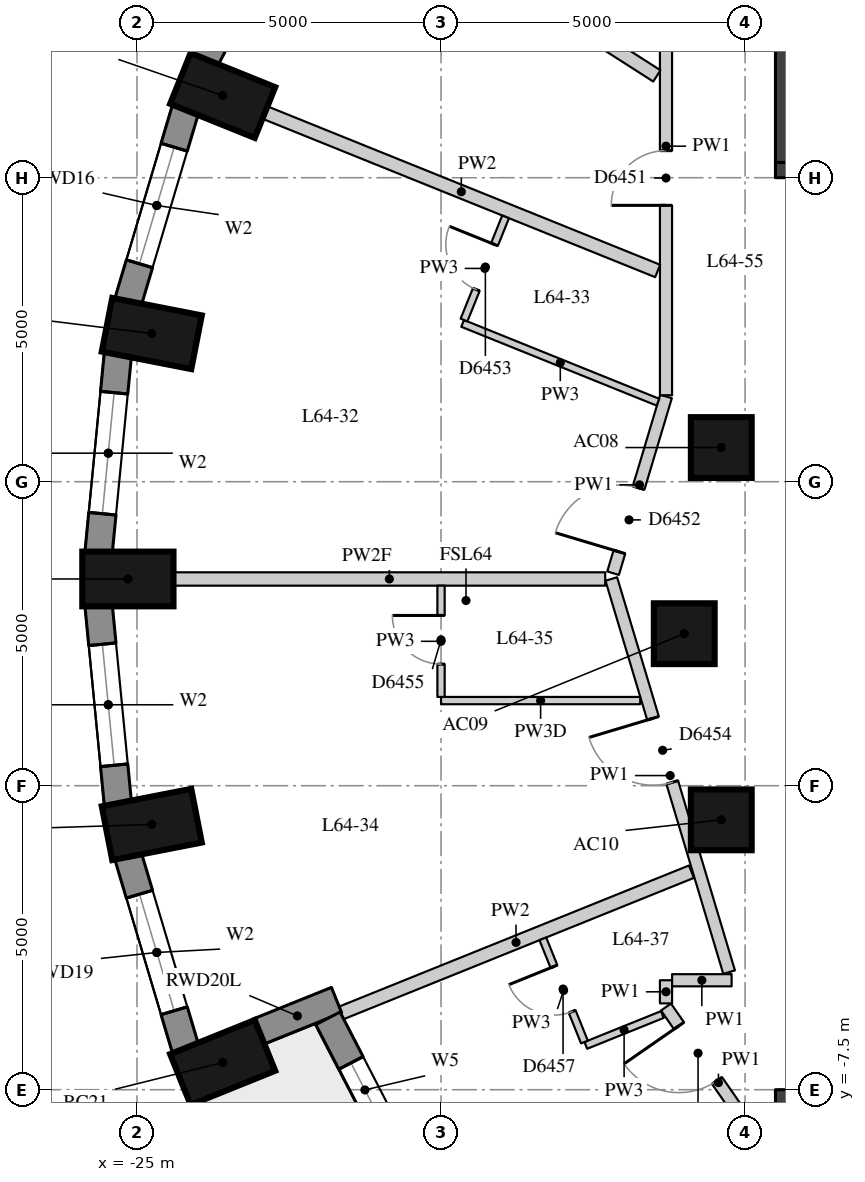
"""IFC4 building model, lengths in metres.
Left out: names, types, materials, properties, quantities, classifications, styles, units other than length and angle.
Written with IfcOpenShell. Run it as: python <this file> out.ifc"""

import sys

from ifc_helpers import new_model, si_unit, direction, frame, frame_2d, origin, origin_2d, place, context, subcontext, project, spatial, rectangle, extrude, element, fill, save


model = new_model("IFC4")
c1 = context("Model", 3, precision=1e-05, world=origin(), true_north=direction((0.0, 1.0)))
c2 = subcontext(c1, "Body", "Model", "MODEL_VIEW")
j1 = project(units=[si_unit("LENGTHUNIT", "METRE"), si_unit("PLANEANGLEUNIT", "RADIAN")], contexts=[c1])
p1 = place(None, origin())
s1 = spatial("IfcSite", under=j1, at=p1, CompositionType="ELEMENT")
p2 = place(p1, origin())
s2 = spatial("IfcBuilding", under=s1, at=p2, CompositionType="ELEMENT")
p3 = place(p2, frame((0.0, 0.0, 225.5)))
s3 = spatial("IfcBuildingStorey", under=s2, at=p3, CompositionType="ELEMENT", Elevation=225.5)
for number, where, z_axis, x_axis in (
    (1, (-23.591, 8.852, 0.0), (0.0, 0.0, 1.0), (-0.927, 0.374, 0.0)),
    (2, (-24.757, 4.937, 0.0), (0.0, 0.0, 1.0), (-0.981, 0.192, 0.0)),
    (3, (-25.15, 0.9, 0.0), (0.0, 0.0, 1.0), (-1.0, 0.0, 0.0)),
    (4, (-24.757, -3.137, 0.0), (0.0, 0.0, 1.0), (-0.981, -0.192, 0.0)),
    (5, (-23.591, -7.052, 0.0), (0.0, 0.0, 1.0), (-0.927, -0.374, 0.0)),
):
    element("IfcColumn", number, at=place(p3, frame(where, z_axis=z_axis, x_axis=x_axis)), inside=s3, PredefinedType="COLUMN", context=c2, shape_type="SweptSolid", body=[
        extrude(rectangle(XDim=1.5, YDim=0.9, at=origin_2d()), origin(), (0.0, 0.0, 1.0), 3.3),
    ])
for number, where, z_axis, x_axis in (
    (6, (-15.391, 3.062, 0.0), (0.0, 0.0, 1.0), (1.0, 0.0, 0.0)),
    (7, (-16.0, 0.0, 0.0), (0.0, 0.0, 1.0), (1.0, 0.0, 0.0)),
    (8, (-15.391, -3.062, 0.0), (0.0, 0.0, 1.0), (1.0, 0.0, 0.0)),
):
    element("IfcColumn", number, at=place(p3, frame(where, z_axis=z_axis, x_axis=x_axis)), inside=s3, PredefinedType="COLUMN", context=c2, shape_type="SweptSolid", body=[
        extrude(rectangle(XDim=1.0, YDim=1.0, at=origin_2d()), origin(), (0.0, 0.0, 1.0), 3.3),
    ])
p4 = place(p3, frame((-22.327, 12.424, 0.0), z_axis=(0.0, 0.0, 1.0), x_axis=(-0.460232593174, -0.887798378113, 0.0)))
e9 = element("IfcWall", 9, at=p4, inside=s3, PredefinedType="SOLIDWALL", context=c2, shape_type="SweptSolid", body=[
    extrude(rectangle(XDim=3.371, YDim=0.45, at=frame_2d((1.685, 0.0))), origin(), (0.0, 0.0, 1.0), 2.85),
])
p5 = place(p4, frame((0.685, 0.0, 0.4)))
e10 = element("IfcOpeningElement", 10, at=p5, cuts=e9, PredefinedType="OPENING", context=c2, shape_type="SweptSolid", body=[
    extrude(rectangle(XDim=2.0, YDim=1.75, at=frame_2d((1.0, 0.875))), frame((0.0, 0.235, 0.0), z_axis=(0.0, -1.0, 0.0), x_axis=(1.0, 0.0, 0.0)), (0.0, 0.0, 1.0), 0.47),
])
p6 = place(p3, frame((-24.2, 8.634, 0.0), z_axis=(0.0, 0.0, 1.0), x_axis=(-0.285444972963, -0.958395099847, 0.0)))
e11 = element("IfcWall", 11, at=p6, inside=s3, PredefinedType="SOLIDWALL", context=c2, shape_type="SweptSolid", body=[
    extrude(rectangle(XDim=3.32, YDim=0.45, at=frame_2d((1.66, 0.0))), origin(), (0.0, 0.0, 1.0), 2.85),
])
p7 = place(p6, frame((0.66, 0.0, 0.4)))
e12 = element("IfcOpeningElement", 12, at=p7, cuts=e11, PredefinedType="OPENING", context=c2, shape_type="SweptSolid", body=[
    extrude(rectangle(XDim=2.0, YDim=1.75, at=frame_2d((1.0, 0.875))), frame((0.0, 0.235, 0.0), z_axis=(0.0, -1.0, 0.0), x_axis=(1.0, 0.0, 0.0)), (0.0, 0.0, 1.0), 0.47),
])
p8 = place(p3, frame((-25.313, 4.608, 0.0), z_axis=(0.0, 0.0, 1.0), x_axis=(-0.096824116835, -0.995301507283, 0.0)))
e13 = element("IfcWall", 13, at=p8, inside=s3, PredefinedType="SOLIDWALL", context=c2, shape_type="SweptSolid", body=[
    extrude(rectangle(XDim=3.293, YDim=0.45, at=frame_2d((1.646, 0.0))), origin(), (0.0, 0.0, 1.0), 2.85),
])
p9 = place(p8, frame((0.646, 0.0, 0.4)))
e14 = element("IfcOpeningElement", 14, at=p9, cuts=e13, PredefinedType="OPENING", context=c2, shape_type="SweptSolid", body=[
    extrude(rectangle(XDim=2.0, YDim=1.75, at=frame_2d((1.0, 0.875))), frame((0.0, 0.235, 0.0), z_axis=(0.0, -1.0, 0.0), x_axis=(1.0, 0.0, 0.0)), (0.0, 0.0, 1.0), 0.47),
])
p10 = place(p3, frame((-25.632, 0.47, 0.0), z_axis=(0.0, 0.0, 1.0), x_axis=(0.096816972749, -0.995302202242, 0.0)))
e15 = element("IfcWall", 15, at=p10, inside=s3, PredefinedType="SOLIDWALL", context=c2, shape_type="SweptSolid", body=[
    extrude(rectangle(XDim=3.293, YDim=0.45, at=frame_2d((1.646, 0.0))), origin(), (0.0, 0.0, 1.0), 2.85),
])
p11 = place(p10, frame((0.646, 0.0, 0.4)))
e16 = element("IfcOpeningElement", 16, at=p11, cuts=e15, PredefinedType="OPENING", context=c2, shape_type="SweptSolid", body=[
    extrude(rectangle(XDim=2.0, YDim=1.75, at=frame_2d((1.0, 0.875))), frame((0.0, 0.235, 0.0), z_axis=(0.0, -1.0, 0.0), x_axis=(1.0, 0.0, 0.0)), (0.0, 0.0, 1.0), 0.47),
])
p12 = place(p3, frame((-25.148, -3.652, 0.0), z_axis=(0.0, 0.0, 1.0), x_axis=(0.285444972963, -0.958395099847, 0.0)))
e17 = element("IfcWall", 17, at=p12, inside=s3, PredefinedType="SOLIDWALL", context=c2, shape_type="SweptSolid", body=[
    extrude(rectangle(XDim=3.32, YDim=0.45, at=frame_2d((1.66, 0.0))), origin(), (0.0, 0.0, 1.0), 2.85),
])
p13 = place(p12, frame((0.66, 0.0, 0.4)))
e18 = element("IfcOpeningElement", 18, at=p13, cuts=e17, PredefinedType="OPENING", context=c2, shape_type="SweptSolid", body=[
    extrude(rectangle(XDim=2.0, YDim=1.75, at=frame_2d((1.0, 0.875))), frame((0.0, 0.235, 0.0), z_axis=(0.0, -1.0, 0.0), x_axis=(1.0, 0.0, 0.0)), (0.0, 0.0, 1.0), 0.47),
])
p14 = place(p3, frame((-23.008, -6.546, 0.0), z_axis=(0.0, 0.0, 1.0), x_axis=(0.927346156366, 0.37420463155, 0.0)))
e19 = element("IfcWall", 19, at=p14, inside=s3, PredefinedType="SOLIDWALL", context=c2, shape_type="SweptSolid", body=[
    extrude(rectangle(XDim=1.39, YDim=0.45, at=frame_2d((0.695, 0.0))), origin(), (0.0, 0.0, 1.0), 2.85),
])
p15 = place(p3, frame((-21.861, -6.326, 0.0), z_axis=(0.0, 0.0, 1.0), x_axis=(0.45924645187, -0.888308896975, 0.0)))
e20 = element("IfcWall", 20, at=p15, inside=s3, PredefinedType="SOLIDWALL", context=c2, shape_type="SweptSolid", body=[
    extrude(rectangle(XDim=3.802, YDim=0.45, at=frame_2d((1.901, 0.0))), origin(), (0.0, 0.0, 1.0), 2.85),
])
p16 = place(p15, frame((0.826, 0.0, 0.4)))
e21 = element("IfcOpeningElement", 21, at=p16, cuts=e20, PredefinedType="OPENING", context=c2, shape_type="SweptSolid", body=[
    extrude(rectangle(XDim=1.0, YDim=1.75, at=frame_2d((0.5, 0.875))), frame((0.0, 0.235, 0.0), z_axis=(0.0, -1.0, 0.0), x_axis=(1.0, 0.0, 0.0)), (0.0, 0.0, 1.0), 0.47),
])
p17 = place(p15, frame((1.976, 0.0, 0.0)))
e22 = element("IfcOpeningElement", 22, at=p17, cuts=e20, PredefinedType="OPENING", context=c2, shape_type="SweptSolid", body=[
    extrude(rectangle(XDim=1.0, YDim=2.15, at=frame_2d((0.5, 1.075))), frame((0.0, 0.235, 0.0), z_axis=(0.0, -1.0, 0.0), x_axis=(1.0, 0.0, 0.0)), (0.0, 0.0, 1.0), 0.47),
])
p18 = place(p3, frame((-14.375, 7.75, -0.28), z_axis=(0.0, 0.0, 1.0), x_axis=(0.0, 1.0, 0.0)))
e23 = element("IfcWall", 23, at=p18, inside=s3, PredefinedType="SHEAR", context=c2, shape_type="SweptSolid", body=[
    extrude(rectangle(XDim=6.0, YDim=0.25, at=frame_2d((3.0, 0.0))), origin(), (0.0, 0.0, 1.0), 3.13),
])
for number, where, z_axis, x_axis in (
    (24, (-14.5, 7.625, -0.28), (0.0, 0.0, 1.0), (1.0, 0.0, 0.0)),
    (25, (-14.5, -7.625, -0.28), (0.0, 0.0, 1.0), (1.0, 0.0, 0.0)),
):
    element("IfcWall", number, at=place(p3, frame(where, z_axis=z_axis, x_axis=x_axis)), inside=s3, PredefinedType="SHEAR", context=c2, shape_type="SweptSolid", body=[
        extrude(rectangle(XDim=5.2, YDim=0.25, at=frame_2d((2.6, 0.0))), origin(), (0.0, 0.0, 1.0), 3.13),
    ])
p19 = place(p3, frame((-14.575, -8.627, 0.0), z_axis=(0.0, 0.0, 1.0), x_axis=(-0.569910381143, 0.821706856163, 0.0)))
e26 = element("IfcWall", 26, at=p19, inside=s3, PredefinedType="PARTITIONING", context=c2, shape_type="SweptSolid", body=[
    extrude(rectangle(XDim=3.026, YDim=0.2, at=frame_2d((1.513, 0.0))), origin(), (0.0, 0.0, 1.0), 2.85),
])
p20 = place(p19, frame((1.552, 0.0, 0.0)))
e27 = element("IfcOpeningElement", 27, at=p20, cuts=e26, PredefinedType="OPENING", context=c2, shape_type="SweptSolid", body=[
    extrude(rectangle(XDim=1.1, YDim=2.1, at=frame_2d((0.55, 1.05))), frame((0.0, 0.11, 0.0), z_axis=(0.0, -1.0, 0.0), x_axis=(1.0, 0.0, 0.0)), (0.0, 0.0, 1.0), 0.22),
])
p21 = place(p3, frame((-16.3, -6.08, 0.0), z_axis=(0.0, 0.0, 1.0), x_axis=(0.0, 1.0, 0.0)))
e28 = element("IfcWall", 28, at=p21, inside=s3, PredefinedType="PARTITIONING", context=c2, shape_type="SweptSolid", body=[
    extrude(rectangle(XDim=0.38, YDim=0.2, at=frame_2d((0.19, 0.0))), origin(), (0.0, 0.0, 1.0), 2.85),
])
p22 = place(p3, frame((-16.2, -5.7, 0.0), z_axis=(0.0, 0.0, 1.0), x_axis=(1.0, 0.0, 0.0)))
e29 = element("IfcWall", 29, at=p22, inside=s3, PredefinedType="PARTITIONING", context=c2, shape_type="SweptSolid", body=[
    extrude(rectangle(XDim=0.979, YDim=0.2, at=frame_2d((0.489, 0.0))), origin(), (0.0, 0.0, 1.0), 2.85),
])
p23 = place(p3, frame((-15.262, -5.567, 0.0), z_axis=(0.0, 0.0, 1.0), x_axis=(-0.28704593875, 0.957916817395, 0.0)))
e30 = element("IfcWall", 30, at=p23, inside=s3, PredefinedType="PARTITIONING", context=c2, shape_type="SweptSolid", body=[
    extrude(rectangle(XDim=6.751, YDim=0.2, at=frame_2d((3.375, 0.0))), origin(), (0.0, 0.0, 1.0), 2.85),
])
p24 = place(p23, frame((3.259, 0.0, 0.0)))
e31 = element("IfcOpeningElement", 31, at=p24, cuts=e30, PredefinedType="OPENING", context=c2, shape_type="SweptSolid", body=[
    extrude(rectangle(XDim=1.1, YDim=2.1, at=frame_2d((0.55, 1.05))), frame((0.0, 0.11, 0.0), z_axis=(0.0, -1.0, 0.0), x_axis=(1.0, 0.0, 0.0)), (0.0, 0.0, 1.0), 0.22),
])
p25 = place(p3, frame((-17.171, 0.995, 0.0), z_axis=(0.0, 0.0, 1.0), x_axis=(0.286919722033, 0.957954629984, 0.0)))
e32 = element("IfcWall", 32, at=p25, inside=s3, PredefinedType="PARTITIONING", context=c2, shape_type="SweptSolid", body=[
    extrude(rectangle(XDim=3.034, YDim=0.2, at=frame_2d((1.517, 0.0))), origin(), (0.0, 0.0, 1.0), 2.85),
])
p26 = place(p25, frame((0.365, 0.0, 0.0)))
e33 = element("IfcOpeningElement", 33, at=p26, cuts=e32, PredefinedType="OPENING", context=c2, shape_type="SweptSolid", body=[
    extrude(rectangle(XDim=1.1, YDim=2.1, at=frame_2d((0.55, 1.05))), frame((0.0, 0.11, 0.0), z_axis=(0.0, -1.0, 0.0), x_axis=(1.0, 0.0, 0.0)), (0.0, 0.0, 1.0), 0.22),
])
p27 = place(p3, frame((-16.3, 3.922, 0.0), z_axis=(0.0, 0.0, 1.0), x_axis=(0.0, 1.0, 0.0)))
e34 = element("IfcWall", 34, at=p27, inside=s3, PredefinedType="PARTITIONING", context=c2, shape_type="SweptSolid", body=[
    extrude(rectangle(XDim=8.193, YDim=0.2, at=frame_2d((4.097, 0.0))), origin(), (0.0, 0.0, 1.0), 2.85),
])
p28 = place(p27, frame((6.953, 0.0, 0.0)))
e35 = element("IfcOpeningElement", 35, at=p28, cuts=e34, PredefinedType="OPENING", context=c2, shape_type="SweptSolid", body=[
    extrude(rectangle(XDim=1.1, YDim=2.1, at=frame_2d((0.55, 1.05))), frame((0.0, 0.11, 0.0), z_axis=(0.0, -1.0, 0.0), x_axis=(1.0, 0.0, 0.0)), (0.0, 0.0, 1.0), 0.22),
])
p29 = place(p27, frame((3.123, 0.0, 0.0)))
e36 = element("IfcOpeningElement", 36, at=p29, cuts=e34, PredefinedType="OPENING", context=c2, shape_type="SweptSolid", body=[
    extrude(rectangle(XDim=0.9, YDim=2.1, at=frame_2d((0.45, 1.05))), frame((0.0, 0.11, 0.0), z_axis=(0.0, -1.0, 0.0), x_axis=(1.0, 0.0, 0.0)), (0.0, 0.0, 1.0), 0.22),
])
p30 = place(p3, frame((-21.055, 12.121, 0.0), z_axis=(0.0, 0.0, 1.0), x_axis=(0.842286811608, -0.539029616061, 0.0)))
e37 = element("IfcWall", 37, at=p30, inside=s3, PredefinedType="PARTITIONING", context=c2, shape_type="SweptSolid", body=[
    extrude(rectangle(XDim=5.466, YDim=0.22, at=frame_2d((2.733, 0.0))), origin(), (0.0, 0.0, 1.0), 2.85),
])
p31 = place(p3, frame((-22.896, 8.571, 0.0), z_axis=(0.0, 0.0, 1.0), x_axis=(0.927387137769, -0.374103056256, 0.0)))
e38 = element("IfcWall", 38, at=p31, inside=s3, PredefinedType="PARTITIONING", context=c2, shape_type="SweptSolid", body=[
    extrude(rectangle(XDim=6.964, YDim=0.22, at=frame_2d((3.482, 0.0))), origin(), (0.0, 0.0, 1.0), 2.85),
])
p32 = place(p3, frame((-24.4, 0.9, 0.0), z_axis=(0.0, 0.0, 1.0), x_axis=(1.0, 0.0, 0.0)))
e39 = element("IfcWall", 39, at=p32, inside=s3, PredefinedType="PARTITIONING", context=c2, shape_type="SweptSolid", body=[
    extrude(rectangle(XDim=7.1, YDim=0.22, at=frame_2d((3.55, 0.0))), origin(), (0.0, 0.0, 1.0), 2.3),
])
p33 = place(p3, frame((-21.651, -6.241, 0.0), z_axis=(0.0, 0.0, 1.0), x_axis=(0.927390089179, 0.37409573974, 0.0)))
e40 = element("IfcWall", 40, at=p33, inside=s3, PredefinedType="PARTITIONING", context=c2, shape_type="SweptSolid", body=[
    extrude(rectangle(XDim=6.221, YDim=0.22, at=frame_2d((3.11, 0.0))), origin(), (0.0, 0.0, 1.0), 2.85),
])
p34 = place(p3, frame((-16.433, 3.808, 0.0), z_axis=(0.0, 0.0, 1.0), x_axis=(-0.927374031513, 0.374135544522, 0.0)))
e41 = element("IfcWall", 41, at=p34, inside=s3, PredefinedType="PARTITIONING", context=c2, shape_type="SweptSolid", body=[
    extrude(rectangle(XDim=3.464, YDim=0.12, at=frame_2d((1.732, 0.0))), origin(), (0.0, 0.0, 1.0), 2.85),
])
p35 = place(p3, frame((-16.725, -1.1, 0.0), z_axis=(0.0, 0.0, 1.0), x_axis=(-1.0, 0.0, 0.0)))
e42 = element("IfcWall", 42, at=p35, inside=s3, PredefinedType="PARTITIONING", context=c2, shape_type="SweptSolid", body=[
    extrude(rectangle(XDim=3.275, YDim=0.12, at=frame_2d((1.638, 0.0))), origin(), (0.0, 0.0, 1.0), 2.3),
])
p36 = place(p3, frame((-16.36, -6.264, 0.0), z_axis=(0.0, 0.0, 1.0), x_axis=(-0.927381089245, -0.374118049967, 0.0)))
e43 = element("IfcWall", 43, at=p36, inside=s3, PredefinedType="PARTITIONING", context=c2, shape_type="SweptSolid", body=[
    extrude(rectangle(XDim=1.357, YDim=0.12, at=frame_2d((0.679, 0.0))), origin(), (0.0, 0.0, 1.0), 2.85),
])
p37 = place(p3, frame((-19.622, 5.159, 0.0), z_axis=(0.0, 0.0, 1.0), x_axis=(0.373873925611, 0.927479534948, 0.0)))
e44 = element("IfcWall", 44, at=p37, inside=s3, PredefinedType="PARTITIONING", context=c2, shape_type="SweptSolid", body=[
    extrude(rectangle(XDim=1.83, YDim=0.12, at=frame_2d((0.915, 0.0))), origin(), (0.0, 0.0, 1.0), 2.85),
])
p38 = place(p37, frame((0.54, 0.0, 0.0)))
e45 = element("IfcOpeningElement", 45, at=p38, cuts=e44, PredefinedType="OPENING", context=c2, shape_type="SweptSolid", body=[
    extrude(rectangle(XDim=0.8, YDim=2.1, at=frame_2d((0.4, 1.05))), frame((0.0, 0.07, 0.0), z_axis=(0.0, -1.0, 0.0), x_axis=(1.0, 0.0, 0.0)), (0.0, 0.0, 1.0), 0.14),
])
p39 = place(p3, frame((-20.0, -1.04, 0.0), z_axis=(0.0, 0.0, 1.0), x_axis=(0.0, 1.0, 0.0)))
e46 = element("IfcWall", 46, at=p39, inside=s3, PredefinedType="PARTITIONING", context=c2, shape_type="SweptSolid", body=[
    extrude(rectangle(XDim=1.83, YDim=0.12, at=frame_2d((0.915, 0.0))), origin(), (0.0, 0.0, 1.0), 2.85),
])
p40 = place(p39, frame((0.54, 0.0, 0.0)))
e47 = element("IfcOpeningElement", 47, at=p40, cuts=e46, PredefinedType="OPENING", context=c2, shape_type="SweptSolid", body=[
    extrude(rectangle(XDim=0.8, YDim=2.1, at=frame_2d((0.4, 1.05))), frame((0.0, 0.07, 0.0), z_axis=(0.0, -1.0, 0.0), x_axis=(1.0, 0.0, 0.0)), (0.0, 0.0, 1.0), 0.14),
])
p41 = place(p3, frame((-17.641, -6.716, 0.0), z_axis=(0.0, 0.0, 1.0), x_axis=(-0.374103450988, 0.927386978536, 0.0)))
e48 = element("IfcWall", 48, at=p41, inside=s3, PredefinedType="PARTITIONING", context=c2, shape_type="SweptSolid", body=[
    extrude(rectangle(XDim=1.83, YDim=0.12, at=frame_2d((0.915, 0.0))), origin(), (0.0, 0.0, 1.0), 2.85),
])
p42 = place(p41, frame((0.54, 0.0, 0.0)))
e49 = element("IfcOpeningElement", 49, at=p42, cuts=e48, PredefinedType="OPENING", context=c2, shape_type="SweptSolid", body=[
    extrude(rectangle(XDim=0.8, YDim=2.1, at=frame_2d((0.4, 1.05))), frame((0.0, 0.07, 0.0), z_axis=(0.0, -1.0, 0.0), x_axis=(1.0, 0.0, 0.0)), (0.0, 0.0, 1.0), 0.14),
])
p43 = place(p7, origin())
e50 = element("IfcWindow", 50, at=p43, inside=s3, PartitioningType="SINGLE_PANEL", PredefinedType="WINDOW", context=c2, shape_type="SweptSolid", body=[
    extrude(rectangle(XDim=2.0, YDim=1.75, at=frame_2d((1.0, 0.875))), frame((0.0, 0.035, 0.0), z_axis=(0.0, -1.0, 0.0), x_axis=(1.0, 0.0, 0.0)), (0.0, 0.0, 1.0), 0.06),
])
fill(e12, e50)
p44 = place(p9, origin())
e51 = element("IfcWindow", 51, at=p44, inside=s3, PartitioningType="SINGLE_PANEL", PredefinedType="WINDOW", context=c2, shape_type="SweptSolid", body=[
    extrude(rectangle(XDim=2.0, YDim=1.75, at=frame_2d((1.0, 0.875))), frame((0.0, 0.035, 0.0), z_axis=(0.0, -1.0, 0.0), x_axis=(1.0, 0.0, 0.0)), (0.0, 0.0, 1.0), 0.06),
])
fill(e14, e51)
p45 = place(p11, origin())
e52 = element("IfcWindow", 52, at=p45, inside=s3, PartitioningType="SINGLE_PANEL", PredefinedType="WINDOW", context=c2, shape_type="SweptSolid", body=[
    extrude(rectangle(XDim=2.0, YDim=1.75, at=frame_2d((1.0, 0.875))), frame((0.0, 0.035, 0.0), z_axis=(0.0, -1.0, 0.0), x_axis=(1.0, 0.0, 0.0)), (0.0, 0.0, 1.0), 0.06),
])
fill(e16, e52)
p46 = place(p13, origin())
e53 = element("IfcWindow", 53, at=p46, inside=s3, PartitioningType="SINGLE_PANEL", PredefinedType="WINDOW", context=c2, shape_type="SweptSolid", body=[
    extrude(rectangle(XDim=2.0, YDim=1.75, at=frame_2d((1.0, 0.875))), frame((0.0, 0.035, 0.0), z_axis=(0.0, -1.0, 0.0), x_axis=(1.0, 0.0, 0.0)), (0.0, 0.0, 1.0), 0.06),
])
fill(e18, e53)
p47 = place(p16, origin())
e54 = element("IfcWindow", 54, at=p47, inside=s3, PartitioningType="SINGLE_PANEL", PredefinedType="WINDOW", context=c2, shape_type="SweptSolid", body=[
    extrude(rectangle(XDim=1.0, YDim=1.75, at=frame_2d((0.5, 0.875))), frame((0.0, 0.035, 0.0), z_axis=(0.0, -1.0, 0.0), x_axis=(1.0, 0.0, 0.0)), (0.0, 0.0, 1.0), 0.06),
])
fill(e21, e54)
p48 = place(p29, origin())
e55 = element("IfcDoor", 55, at=p48, inside=s3, OperationType="SINGLE_SWING_LEFT", PredefinedType="DOOR", context=c2, shape_type="SweptSolid", body=[
    extrude(rectangle(XDim=0.9, YDim=2.1, at=frame_2d((0.45, 1.05))), frame((0.0, 0.025, 0.0), z_axis=(0.0, -1.0, 0.0), x_axis=(1.0, 0.0, 0.0)), (0.0, 0.0, 1.0), 0.05),
])
fill(e36, e55)
p49 = place(p26, origin())
e56 = element("IfcDoor", 56, at=p49, inside=s3, OperationType="SINGLE_SWING_LEFT", PredefinedType="DOOR", context=c2, shape_type="SweptSolid", body=[
    extrude(rectangle(XDim=1.1, YDim=2.1, at=frame_2d((0.55, 1.05))), frame((0.0, 0.025, 0.0), z_axis=(0.0, -1.0, 0.0), x_axis=(1.0, 0.0, 0.0)), (0.0, 0.0, 1.0), 0.05),
])
fill(e33, e56)
p50 = place(p38, origin())
e57 = element("IfcDoor", 57, at=p50, inside=s3, OperationType="SINGLE_SWING_RIGHT", PredefinedType="DOOR", context=c2, shape_type="SweptSolid", body=[
    extrude(rectangle(XDim=0.8, YDim=2.1, at=frame_2d((0.4, 1.05))), frame((0.0, 0.025, 0.0), z_axis=(0.0, -1.0, 0.0), x_axis=(1.0, 0.0, 0.0)), (0.0, 0.0, 1.0), 0.05),
])
fill(e45, e57)
p51 = place(p24, origin())
e58 = element("IfcDoor", 58, at=p51, inside=s3, OperationType="SINGLE_SWING_RIGHT", PredefinedType="DOOR", context=c2, shape_type="SweptSolid", body=[
    extrude(rectangle(XDim=1.1, YDim=2.1, at=frame_2d((0.55, 1.05))), frame((0.0, 0.025, 0.0), z_axis=(0.0, -1.0, 0.0), x_axis=(1.0, 0.0, 0.0)), (0.0, 0.0, 1.0), 0.05),
])
fill(e31, e58)
p52 = place(p40, origin())
e59 = element("IfcDoor", 59, at=p52, inside=s3, OperationType="SINGLE_SWING_RIGHT", PredefinedType="DOOR", context=c2, shape_type="SweptSolid", body=[
    extrude(rectangle(XDim=0.8, YDim=2.1, at=frame_2d((0.4, 1.05))), frame((0.0, 0.025, 0.0), z_axis=(0.0, -1.0, 0.0), x_axis=(1.0, 0.0, 0.0)), (0.0, 0.0, 1.0), 0.05),
])
fill(e47, e59)
p53 = place(p20, origin())
e60 = element("IfcDoor", 60, at=p53, inside=s3, OperationType="SINGLE_SWING_RIGHT", PredefinedType="DOOR", context=c2, shape_type="SweptSolid", body=[
    extrude(rectangle(XDim=1.1, YDim=2.1, at=frame_2d((0.55, 1.05))), frame((0.0, 0.025, 0.0), z_axis=(0.0, -1.0, 0.0), x_axis=(1.0, 0.0, 0.0)), (0.0, 0.0, 1.0), 0.05),
])
fill(e27, e60)
p54 = place(p42, origin())
e61 = element("IfcDoor", 61, at=p54, inside=s3, OperationType="SINGLE_SWING_RIGHT", PredefinedType="DOOR", context=c2, shape_type="SweptSolid", body=[
    extrude(rectangle(XDim=0.8, YDim=2.1, at=frame_2d((0.4, 1.05))), frame((0.0, 0.025, 0.0), z_axis=(0.0, -1.0, 0.0), x_axis=(1.0, 0.0, 0.0)), (0.0, 0.0, 1.0), 0.05),
])
fill(e49, e61)
save(model, sys.argv[1])
